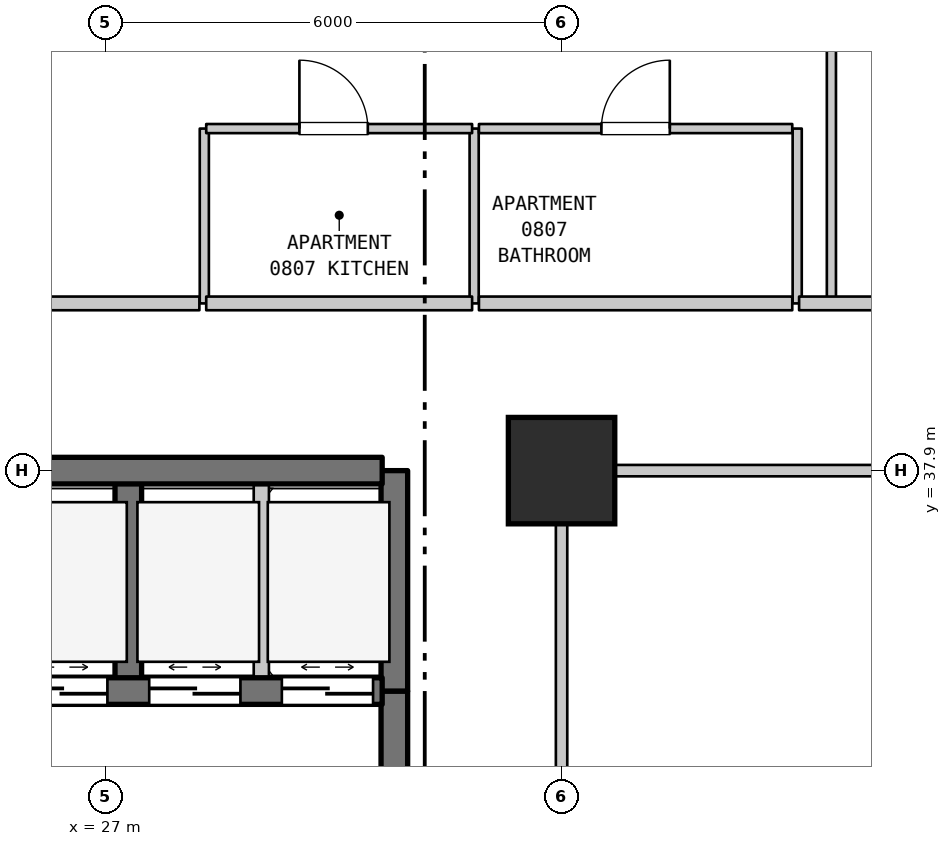
"""IFC4 building model, lengths in metres.
Left out: names, types, materials, properties, quantities, classifications, styles, units other than length and angle.
Written with IfcOpenShell. Run it as: python <this file> out.ifc"""

import sys

from ifc_helpers import new_model, si_unit, direction, frame, frame_2d, origin, origin_2d, place, context, subcontext, project, spatial, rectangle, extrude, element, fill, save


model = new_model("IFC4")
c1 = context("Model", 3, precision=1e-05, world=origin(), true_north=direction((0.0, 1.0)))
c2 = subcontext(c1, "Body", "Model", "MODEL_VIEW")
j1 = project(units=[si_unit("LENGTHUNIT", "METRE"), si_unit("PLANEANGLEUNIT", "RADIAN")], contexts=[c1])
p1 = place(None, origin())
s1 = spatial("IfcSite", under=j1, at=p1, CompositionType="ELEMENT")
p2 = place(p1, origin())
s2 = spatial("IfcBuilding", under=s1, at=p2, CompositionType="ELEMENT")
p3 = place(p2, frame((0.0, 0.0, 38.8)))
s3 = spatial("IfcBuildingStorey", under=s2, at=p3, CompositionType="ELEMENT", Elevation=38.8)
p4 = place(p3, frame((33.0, 37.9, 0.0), z_axis=(0.0, 0.0, 1.0), x_axis=(1.0, 0.0, 0.0)))
e1 = element("IfcColumn", 1, at=p4, inside=s3, PredefinedType="COLUMN", context=c2, shape_type="SweptSolid", body=[
    extrude(rectangle(XDim=1.4, YDim=1.4, at=origin_2d()), origin(), (0.0, 0.0, 1.0), 3.7),
])
p5 = place(p3, frame((27.3, 35.0, 0.0), z_axis=(0.0, 0.0, 1.0), x_axis=(0.0, 1.0, 0.0)))
e2 = element("IfcWall", 2, at=p5, inside=s3, PredefinedType="SHEAR", context=c2, shape_type="SweptSolid", body=[
    extrude(rectangle(XDim=2.9, YDim=0.35, at=frame_2d((1.45, 0.0))), origin(), (0.0, 0.0, 1.0), 3.385),
])
p6 = place(p3, frame((28.3, 40.1, 0.0), z_axis=(0.0, 0.0, 1.0), x_axis=(0.0, 1.0, 0.0)))
e3 = element("IfcWall", 3, at=p6, inside=s3, PredefinedType="PARTITIONING", context=c2, shape_type="SweptSolid", body=[
    extrude(rectangle(XDim=2.3, YDim=0.12, at=frame_2d((1.15, 0.0))), origin(), (0.0, 0.0, 1.0), 3.385),
])
p7 = place(p3, frame((29.05, 35.0, 0.0), z_axis=(0.0, 0.0, 1.0), x_axis=(0.0, 1.0, 0.0)))
e4 = element("IfcWall", 4, at=p7, inside=s3, PredefinedType="STANDARD", context=c2, shape_type="SweptSolid", body=[
    extrude(rectangle(XDim=2.9, YDim=0.2, at=frame_2d((1.45, 0.0))), origin(), (0.0, 0.0, 1.0), 3.385),
])
p8 = place(p3, frame((30.8, 31.5, 0.0), z_axis=(0.0, 0.0, 1.0), x_axis=(0.0, 1.0, 0.0)))
e5 = element("IfcWall", 5, at=p8, inside=s3, PredefinedType="SHEAR", context=c2, shape_type="SweptSolid", body=[
    extrude(rectangle(XDim=3.5, YDim=0.35, at=frame_2d((1.75, 0.0))), origin(), (0.0, 0.0, 1.0), 3.385),
])
p9 = place(p8, frame((1.15, 0.0, 0.0)))
e6 = element("IfcOpeningElement", 6, at=p9, cuts=e5, PredefinedType="OPENING", context=c2, shape_type="SweptSolid", body=[
    extrude(rectangle(XDim=1.2, YDim=2.2, at=frame_2d((0.6, 1.1))), frame((0.0, 0.185, 0.0), z_axis=(0.0, -1.0, 0.0), x_axis=(1.0, 0.0, 0.0)), (0.0, 0.0, 1.0), 0.37),
])
p10 = place(p3, frame((30.8, 35.0, 0.0), z_axis=(0.0, 0.0, 1.0), x_axis=(0.0, 1.0, 0.0)))
e7 = element("IfcWall", 7, at=p10, inside=s3, PredefinedType="SHEAR", context=c2, shape_type="SweptSolid", body=[
    extrude(rectangle(XDim=2.9, YDim=0.35, at=frame_2d((1.45, 0.0))), origin(), (0.0, 0.0, 1.0), 3.385),
])
p11 = place(p3, frame((31.85, 40.1, 0.0), z_axis=(0.0, 0.0, 1.0), x_axis=(0.0, 1.0, 0.0)))
e8 = element("IfcWall", 8, at=p11, inside=s3, PredefinedType="PARTITIONING", context=c2, shape_type="SweptSolid", body=[
    extrude(rectangle(XDim=2.3, YDim=0.12, at=frame_2d((1.15, 0.0))), origin(), (0.0, 0.0, 1.0), 3.385),
])
p12 = place(p3, frame((33.0, 27.91, 0.0), z_axis=(0.0, 0.0, 1.0), x_axis=(0.0, 1.0, 0.0)))
e9 = element("IfcWall", 9, at=p12, inside=s3, PredefinedType="STANDARD", context=c2, shape_type="SweptSolid", body=[
    extrude(rectangle(XDim=9.98, YDim=0.15, at=frame_2d((4.99, 0.0))), origin(), (0.0, 0.0, 1.0), 2.885),
])
p13 = place(p3, frame((36.1, 40.1, 0.0), z_axis=(0.0, 0.0, 1.0), x_axis=(0.0, 1.0, 0.0)))
e10 = element("IfcWall", 10, at=p13, inside=s3, PredefinedType="PARTITIONING", context=c2, shape_type="SweptSolid", body=[
    extrude(rectangle(XDim=2.3, YDim=0.12, at=frame_2d((1.15, 0.0))), origin(), (0.0, 0.0, 1.0), 3.385),
])
p14 = place(p3, frame((36.55, 40.1, 0.0), z_axis=(0.0, 0.0, 1.0), x_axis=(0.0, 1.0, 0.0)))
e11 = element("IfcWall", 11, at=p14, inside=s3, PredefinedType="PARTITIONING", context=c2, shape_type="SweptSolid", body=[
    extrude(rectangle(XDim=13.79, YDim=0.12, at=frame_2d((6.895, 0.0))), origin(), (0.0, 0.0, 1.0), 3.385),
])
p15 = place(p3, frame((19.16, 35.0, 0.0), z_axis=(0.0, 0.0, 1.0), x_axis=(1.0, 0.0, 0.0)))
e12 = element("IfcWall", 12, at=p15, inside=s3, PredefinedType="SHEAR", context=c2, shape_type="SweptSolid", body=[
    extrude(rectangle(XDim=11.48, YDim=0.35, at=frame_2d((5.74, 0.0))), origin(), (0.0, 0.0, 1.0), 3.385),
])
p16 = place(p15, frame((0.365, 0.0, 0.0)))
e13 = element("IfcOpeningElement", 13, at=p16, cuts=e12, PredefinedType="OPENING", context=c2, shape_type="SweptSolid", body=[
    extrude(rectangle(XDim=1.35, YDim=2.2, at=frame_2d((0.675, 1.1))), frame((0.0, 0.185, 0.0), z_axis=(0.0, -1.0, 0.0), x_axis=(1.0, 0.0, 0.0)), (0.0, 0.0, 1.0), 0.37),
])
p17 = place(p15, frame((2.765, 0.0, 0.0)))
e14 = element("IfcOpeningElement", 14, at=p17, cuts=e12, PredefinedType="OPENING", context=c2, shape_type="SweptSolid", body=[
    extrude(rectangle(XDim=1.35, YDim=2.2, at=frame_2d((0.675, 1.1))), frame((0.0, 0.185, 0.0), z_axis=(0.0, -1.0, 0.0), x_axis=(1.0, 0.0, 0.0)), (0.0, 0.0, 1.0), 0.37),
])
p18 = place(p15, frame((4.915, 0.0, 0.0)))
e15 = element("IfcOpeningElement", 15, at=p18, cuts=e12, PredefinedType="OPENING", context=c2, shape_type="SweptSolid", body=[
    extrude(rectangle(XDim=1.2, YDim=2.2, at=frame_2d((0.6, 1.1))), frame((0.0, 0.185, 0.0), z_axis=(0.0, -1.0, 0.0), x_axis=(1.0, 0.0, 0.0)), (0.0, 0.0, 1.0), 0.37),
])
p19 = place(p15, frame((6.665, 0.0, 0.0)))
e16 = element("IfcOpeningElement", 16, at=p19, cuts=e12, PredefinedType="OPENING", context=c2, shape_type="SweptSolid", body=[
    extrude(rectangle(XDim=1.2, YDim=2.2, at=frame_2d((0.6, 1.1))), frame((0.0, 0.185, 0.0), z_axis=(0.0, -1.0, 0.0), x_axis=(1.0, 0.0, 0.0)), (0.0, 0.0, 1.0), 0.37),
])
p20 = place(p15, frame((8.415, 0.0, 0.0)))
e17 = element("IfcOpeningElement", 17, at=p20, cuts=e12, PredefinedType="OPENING", context=c2, shape_type="SweptSolid", body=[
    extrude(rectangle(XDim=1.2, YDim=2.2, at=frame_2d((0.6, 1.1))), frame((0.0, 0.185, 0.0), z_axis=(0.0, -1.0, 0.0), x_axis=(1.0, 0.0, 0.0)), (0.0, 0.0, 1.0), 0.37),
])
p21 = place(p15, frame((10.16, 0.0, 0.0)))
e18 = element("IfcOpeningElement", 18, at=p21, cuts=e12, PredefinedType="OPENING", context=c2, shape_type="SweptSolid", body=[
    extrude(rectangle(XDim=1.2, YDim=2.2, at=frame_2d((0.6, 1.1))), frame((0.0, 0.185, 0.0), z_axis=(0.0, -1.0, 0.0), x_axis=(1.0, 0.0, 0.0)), (0.0, 0.0, 1.0), 0.37),
])
p22 = place(p3, frame((19.16, 37.9, 0.0), z_axis=(0.0, 0.0, 1.0), x_axis=(1.0, 0.0, 0.0)))
e19 = element("IfcWall", 19, at=p22, inside=s3, PredefinedType="SHEAR", context=c2, shape_type="SweptSolid", body=[
    extrude(rectangle(XDim=11.48, YDim=0.35, at=frame_2d((5.74, 0.0))), origin(), (0.0, 0.0, 1.0), 3.385),
])
p23 = place(p3, frame((33.07, 37.9, 0.0), z_axis=(0.0, 0.0, 1.0), x_axis=(1.0, 0.0, 0.0)))
e20 = element("IfcWall", 20, at=p23, inside=s3, PredefinedType="STANDARD", context=c2, shape_type="SweptSolid", body=[
    extrude(rectangle(XDim=26.935, YDim=0.15, at=frame_2d((13.467, 0.0))), origin(), (0.0, 0.0, 1.0), 3.385),
])
p24 = place(p3, frame((23.195, 40.1, 0.0), z_axis=(0.0, 0.0, 1.0), x_axis=(1.0, 0.0, 0.0)))
e21 = element("IfcWall", 21, at=p24, inside=s3, PredefinedType="STANDARD", context=c2, shape_type="SweptSolid", body=[
    extrude(rectangle(XDim=5.04, YDim=0.18, at=frame_2d((2.52, 0.0))), origin(), (0.0, 0.0, 1.0), 3.385),
])
p25 = place(p24, frame((1.75, 0.0, 0.0)))
e22 = element("IfcOpeningElement", 22, at=p25, cuts=e21, PredefinedType="OPENING", context=c2, shape_type="SweptSolid", body=[
    extrude(rectangle(XDim=1.0, YDim=2.15, at=frame_2d((0.5, 1.075))), frame((0.0, 0.1, 0.0), z_axis=(0.0, -1.0, 0.0), x_axis=(1.0, 0.0, 0.0)), (0.0, 0.0, 1.0), 0.2),
])
p26 = place(p3, frame((28.325, 40.1, 0.0), z_axis=(0.0, 0.0, 1.0), x_axis=(1.0, 0.0, 0.0)))
e23 = element("IfcWall", 23, at=p26, inside=s3, PredefinedType="STANDARD", context=c2, shape_type="SweptSolid", body=[
    extrude(rectangle(XDim=3.498, YDim=0.18, at=frame_2d((1.749, 0.0))), origin(), (0.0, 0.0, 1.0), 3.385),
])
p27 = place(p3, frame((31.913, 40.1, 0.0), z_axis=(0.0, 0.0, 1.0), x_axis=(1.0, 0.0, 0.0)))
e24 = element("IfcWall", 24, at=p27, inside=s3, PredefinedType="STANDARD", context=c2, shape_type="SweptSolid", body=[
    extrude(rectangle(XDim=4.122, YDim=0.18, at=frame_2d((2.061, 0.0))), origin(), (0.0, 0.0, 1.0), 3.385),
])
p28 = place(p3, frame((36.125, 40.1, 0.0), z_axis=(0.0, 0.0, 1.0), x_axis=(1.0, 0.0, 0.0)))
e25 = element("IfcWall", 25, at=p28, inside=s3, PredefinedType="STANDARD", context=c2, shape_type="SweptSolid", body=[
    extrude(rectangle(XDim=5.14, YDim=0.18, at=frame_2d((2.57, 0.0))), origin(), (0.0, 0.0, 1.0), 3.385),
])
p29 = place(p28, frame((2.198, 0.0, 0.0)))
e26 = element("IfcOpeningElement", 26, at=p29, cuts=e25, PredefinedType="OPENING", context=c2, shape_type="SweptSolid", body=[
    extrude(rectangle(XDim=1.0, YDim=2.15, at=frame_2d((0.5, 1.075))), frame((0.0, 0.1, 0.0), z_axis=(0.0, -1.0, 0.0), x_axis=(1.0, 0.0, 0.0)), (0.0, 0.0, 1.0), 0.2),
])
p30 = place(p3, frame((28.325, 42.4, 0.0), z_axis=(0.0, 0.0, 1.0), x_axis=(1.0, 0.0, 0.0)))
e27 = element("IfcWall", 27, at=p30, inside=s3, PredefinedType="PARTITIONING", context=c2, shape_type="SweptSolid", body=[
    extrude(rectangle(XDim=3.498, YDim=0.12, at=frame_2d((1.749, 0.0))), origin(), (0.0, 0.0, 1.0), 3.385),
])
p31 = place(p30, frame((1.226, 0.0, 0.0)))
e28 = element("IfcOpeningElement", 28, at=p31, cuts=e27, PredefinedType="OPENING", context=c2, shape_type="SweptSolid", body=[
    extrude(rectangle(XDim=0.9, YDim=2.15, at=frame_2d((0.45, 1.075))), frame((0.0, 0.07, 0.0), z_axis=(0.0, -1.0, 0.0), x_axis=(1.0, 0.0, 0.0)), (0.0, 0.0, 1.0), 0.14),
])
p32 = place(p3, frame((31.913, 42.4, 0.0), z_axis=(0.0, 0.0, 1.0), x_axis=(1.0, 0.0, 0.0)))
e29 = element("IfcWall", 29, at=p32, inside=s3, PredefinedType="PARTITIONING", context=c2, shape_type="SweptSolid", body=[
    extrude(rectangle(XDim=4.122, YDim=0.12, at=frame_2d((2.061, 0.0))), origin(), (0.0, 0.0, 1.0), 3.385),
])
p33 = place(p32, frame((1.611, 0.0, 0.0)))
e30 = element("IfcOpeningElement", 30, at=p33, cuts=e29, PredefinedType="OPENING", context=c2, shape_type="SweptSolid", body=[
    extrude(rectangle(XDim=0.9, YDim=2.1, at=frame_2d((0.45, 1.05))), frame((0.0, 0.07, 0.0), z_axis=(0.0, -1.0, 0.0), x_axis=(1.0, 0.0, 0.0)), (0.0, 0.0, 1.0), 0.14),
])
p34 = place(p19, origin())
e31 = element("IfcDoor", 31, at=p34, inside=s3, OperationType="DOUBLE_DOOR_SLIDING", PredefinedType="DOOR", context=c2, shape_type="SweptSolid", body=[
    extrude(rectangle(XDim=1.2, YDim=2.2, at=frame_2d((0.6, 1.1))), frame((0.0, 0.025, 0.0), z_axis=(0.0, -1.0, 0.0), x_axis=(1.0, 0.0, 0.0)), (0.0, 0.0, 1.0), 0.05),
])
fill(e16, e31)
p35 = place(p20, origin())
e32 = element("IfcDoor", 32, at=p35, inside=s3, OperationType="DOUBLE_DOOR_SLIDING", PredefinedType="DOOR", context=c2, shape_type="SweptSolid", body=[
    extrude(rectangle(XDim=1.2, YDim=2.2, at=frame_2d((0.6, 1.1))), frame((0.0, 0.025, 0.0), z_axis=(0.0, -1.0, 0.0), x_axis=(1.0, 0.0, 0.0)), (0.0, 0.0, 1.0), 0.05),
])
fill(e17, e32)
p36 = place(p21, origin())
e33 = element("IfcDoor", 33, at=p36, inside=s3, OperationType="DOUBLE_DOOR_SLIDING", PredefinedType="DOOR", context=c2, shape_type="SweptSolid", body=[
    extrude(rectangle(XDim=1.2, YDim=2.2, at=frame_2d((0.6, 1.1))), frame((0.0, 0.025, 0.0), z_axis=(0.0, -1.0, 0.0), x_axis=(1.0, 0.0, 0.0)), (0.0, 0.0, 1.0), 0.05),
])
fill(e18, e33)
p37 = place(p31, origin())
e34 = element("IfcDoor", 34, at=p37, inside=s3, OperationType="SINGLE_SWING_LEFT", PredefinedType="DOOR", context=c2, shape_type="SweptSolid", body=[
    extrude(rectangle(XDim=0.9, YDim=2.15, at=frame_2d((0.45, 1.075))), frame((0.0, 0.025, 0.0), z_axis=(0.0, -1.0, 0.0), x_axis=(1.0, 0.0, 0.0)), (0.0, 0.0, 1.0), 0.05),
])
fill(e28, e34)
p38 = place(p33, origin())
e35 = element("IfcDoor", 35, at=p38, inside=s3, OperationType="SINGLE_SWING_RIGHT", PredefinedType="DOOR", context=c2, shape_type="SweptSolid", body=[
    extrude(rectangle(XDim=0.9, YDim=2.1, at=frame_2d((0.45, 1.05))), frame((0.0, 0.025, 0.0), z_axis=(0.0, -1.0, 0.0), x_axis=(1.0, 0.0, 0.0)), (0.0, 0.0, 1.0), 0.05),
])
fill(e30, e35)
save(model, sys.argv[1])
